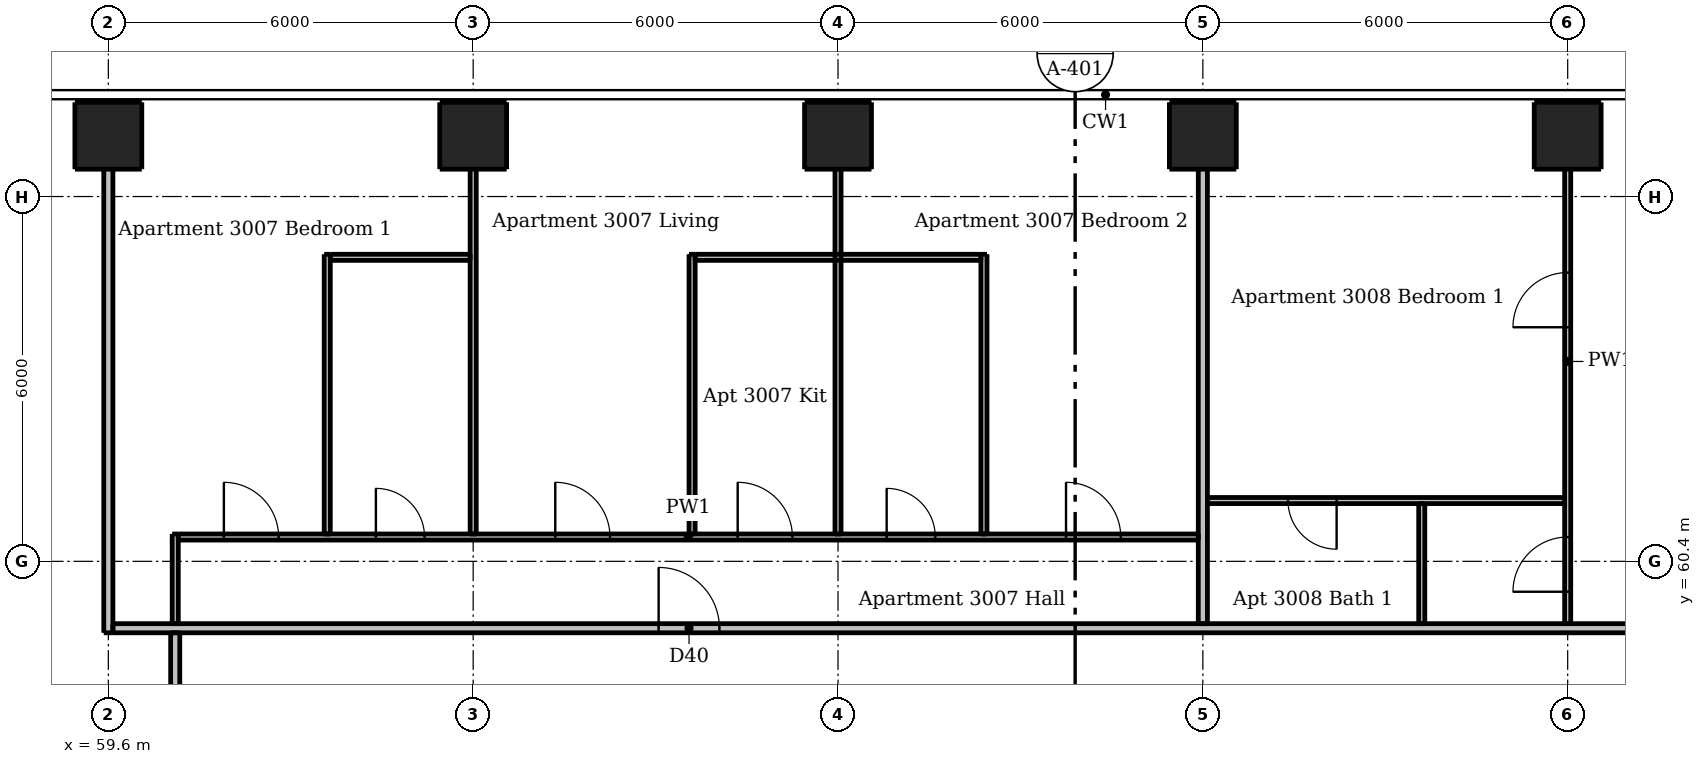
"""IFC4 building model, lengths in metres.
Left out: names, types, materials, properties, quantities, classifications, styles, units other than length and angle.
Written with IfcOpenShell. Run it as: python <this file> out.ifc"""

import sys

from ifc_helpers import new_model, si_unit, direction, frame, frame_2d, origin, origin_2d, place, context, subcontext, project, spatial, rectangle, extrude, element, fill, save


model = new_model("IFC4")
c1 = context("Model", 3, precision=1e-05, world=origin(), true_north=direction((0.0, 1.0)))
c2 = subcontext(c1, "Body", "Model", "MODEL_VIEW")
j1 = project(units=[si_unit("LENGTHUNIT", "METRE"), si_unit("PLANEANGLEUNIT", "RADIAN")], contexts=[c1])
p1 = place(None, origin())
s1 = spatial("IfcSite", under=j1, at=p1, CompositionType="ELEMENT")
p2 = place(p1, origin())
s2 = spatial("IfcBuilding", under=s1, at=p2, CompositionType="ELEMENT")
p3 = place(p2, frame((0.0, 0.0, 111.7)))
s3 = spatial("IfcBuildingStorey", under=s2, at=p3, CompositionType="ELEMENT", Elevation=111.7)
for number, where, z_axis, x_axis in (
    (1, (59.6, 67.4, 0.0), (0.0, 0.0, 1.0), (1.0, 0.0, 0.0)),
    (2, (65.6, 67.4, 0.0), (0.0, 0.0, 1.0), (1.0, 0.0, 0.0)),
    (3, (71.6, 67.4, 0.0), (0.0, 0.0, 1.0), (1.0, 0.0, 0.0)),
    (4, (77.6, 67.4, 0.0), (0.0, 0.0, 1.0), (1.0, 0.0, 0.0)),
    (5, (83.6, 67.4, 0.0), (0.0, 0.0, 1.0), (1.0, 0.0, 0.0)),
):
    element("IfcColumn", number, at=place(p3, frame(where, z_axis=z_axis, x_axis=x_axis)), inside=s3, PredefinedType="COLUMN", context=c2, shape_type="SweptSolid", body=[
        extrude(rectangle(XDim=1.1, YDim=1.1, at=origin_2d()), origin(), (0.0, 0.0, 1.0), 3.05),
    ])
p4 = place(p3, frame((60.7, 59.375, 0.0), z_axis=(0.0, 0.0, 1.0), x_axis=(0.0, 1.0, 0.0)))
e6 = element("IfcWall", 6, at=p4, inside=s3, PredefinedType="PARTITIONING", context=c2, shape_type="SweptSolid", body=[
    extrude(rectangle(XDim=1.475, YDim=0.1, at=frame_2d((0.738, 0.0))), origin(), (0.0, 0.0, 1.0), 3.05),
])
p5 = place(p3, frame((63.2, 60.85, 0.0), z_axis=(0.0, 0.0, 1.0), x_axis=(0.0, 1.0, 0.0)))
e7 = element("IfcWall", 7, at=p5, inside=s3, PredefinedType="PARTITIONING", context=c2, shape_type="SweptSolid", body=[
    extrude(rectangle(XDim=4.6, YDim=0.1, at=frame_2d((2.3, 0.0))), origin(), (0.0, 0.0, 1.0), 3.05),
])
p6 = place(p3, frame((65.6, 60.85, 0.0), z_axis=(0.0, 0.0, 1.0), x_axis=(0.0, 1.0, 0.0)))
e8 = element("IfcWall", 8, at=p6, inside=s3, PredefinedType="PARTITIONING", context=c2, shape_type="SweptSolid", body=[
    extrude(rectangle(XDim=7.15, YDim=0.1, at=frame_2d((3.575, 0.0))), origin(), (0.0, 0.0, 1.0), 2.516),
])
p7 = place(p3, frame((69.2, 60.85, 0.0), z_axis=(0.0, 0.0, 1.0), x_axis=(0.0, 1.0, 0.0)))
e9 = element("IfcWall", 9, at=p7, inside=s3, PredefinedType="PARTITIONING", context=c2, shape_type="SweptSolid", body=[
    extrude(rectangle(XDim=4.6, YDim=0.1, at=frame_2d((2.3, 0.0))), origin(), (0.0, 0.0, 1.0), 3.05),
])
p8 = place(p3, frame((71.6, 60.85, 0.0), z_axis=(0.0, 0.0, 1.0), x_axis=(0.0, 1.0, 0.0)))
e10 = element("IfcWall", 10, at=p8, inside=s3, PredefinedType="PARTITIONING", context=c2, shape_type="SweptSolid", body=[
    extrude(rectangle(XDim=7.15, YDim=0.1, at=frame_2d((3.575, 0.0))), origin(), (0.0, 0.0, 1.0), 2.516),
])
p9 = place(p3, frame((74.0, 60.85, 0.0), z_axis=(0.0, 0.0, 1.0), x_axis=(0.0, 1.0, 0.0)))
e11 = element("IfcWall", 11, at=p9, inside=s3, PredefinedType="PARTITIONING", context=c2, shape_type="SweptSolid", body=[
    extrude(rectangle(XDim=4.6, YDim=0.1, at=frame_2d((2.3, 0.0))), origin(), (0.0, 0.0, 1.0), 3.05),
])
p10 = place(p3, frame((81.2, 59.375, 0.0), z_axis=(0.0, 0.0, 1.0), x_axis=(0.0, 1.0, 0.0)))
e12 = element("IfcWall", 12, at=p10, inside=s3, PredefinedType="PARTITIONING", context=c2, shape_type="SweptSolid", body=[
    extrude(rectangle(XDim=1.975, YDim=0.1, at=frame_2d((0.988, 0.0))), origin(), (0.0, 0.0, 1.0), 3.05),
])
p11 = place(p3, frame((83.6, 59.375, 0.0), z_axis=(0.0, 0.0, 1.0), x_axis=(0.0, 1.0, 0.0)))
e13 = element("IfcWall", 13, at=p11, inside=s3, PredefinedType="PARTITIONING", context=c2, shape_type="SweptSolid", body=[
    extrude(rectangle(XDim=8.625, YDim=0.1, at=frame_2d((4.312, 0.0))), origin(), (0.0, 0.0, 1.0), 2.516),
])
p12 = place(p11, frame((0.525, 0.0, 0.0)))
e14 = element("IfcOpeningElement", 14, at=p12, cuts=e13, PredefinedType="OPENING", context=c2, shape_type="SweptSolid", body=[
    extrude(rectangle(XDim=0.9, YDim=2.1, at=frame_2d((0.45, 1.05))), frame((0.0, 0.06, 0.0), z_axis=(0.0, -1.0, 0.0), x_axis=(1.0, 0.0, 0.0)), (0.0, 0.0, 1.0), 0.12),
])
p13 = place(p11, frame((4.875, 0.0, 0.0)))
e15 = element("IfcOpeningElement", 15, at=p13, cuts=e13, PredefinedType="OPENING", context=c2, shape_type="SweptSolid", body=[
    extrude(rectangle(XDim=0.9, YDim=2.1, at=frame_2d((0.45, 1.05))), frame((0.0, 0.06, 0.0), z_axis=(0.0, -1.0, 0.0), x_axis=(1.0, 0.0, 0.0)), (0.0, 0.0, 1.0), 0.12),
])
p14 = place(p3, frame((63.25, 65.4, 0.0), z_axis=(0.0, 0.0, 1.0), x_axis=(1.0, 0.0, 0.0)))
e16 = element("IfcWall", 16, at=p14, inside=s3, PredefinedType="PARTITIONING", context=c2, shape_type="SweptSolid", body=[
    extrude(rectangle(XDim=2.3, YDim=0.1, at=frame_2d((1.15, 0.0))), origin(), (0.0, 0.0, 1.0), 3.05),
])
p15 = place(p3, frame((69.25, 65.4, 0.0), z_axis=(0.0, 0.0, 1.0), x_axis=(1.0, 0.0, 0.0)))
e17 = element("IfcWall", 17, at=p15, inside=s3, PredefinedType="PARTITIONING", context=c2, shape_type="SweptSolid", body=[
    extrude(rectangle(XDim=4.7, YDim=0.1, at=frame_2d((2.35, 0.0))), origin(), (0.0, 0.0, 1.0), 3.05),
])
p16 = place(p3, frame((83.55, 61.4, 0.0), z_axis=(0.0, 0.0, 1.0), x_axis=(-1.0, 0.0, 0.0)))
e18 = element("IfcWall", 18, at=p16, inside=s3, PredefinedType="PARTITIONING", context=c2, shape_type="SweptSolid", body=[
    extrude(rectangle(XDim=5.875, YDim=0.1, at=frame_2d((2.938, 0.0))), origin(), (0.0, 0.0, 1.0), 3.05),
])
p17 = place(p16, frame((3.75, 0.0, 0.0)))
e19 = element("IfcOpeningElement", 19, at=p17, cuts=e18, PredefinedType="OPENING", context=c2, shape_type="SweptSolid", body=[
    extrude(rectangle(XDim=0.8, YDim=2.1, at=frame_2d((0.4, 1.05))), frame((0.0, 0.06, 0.0), z_axis=(0.0, -1.0, 0.0), x_axis=(1.0, 0.0, 0.0)), (0.0, 0.0, 1.0), 0.12),
])
p18 = place(p3, frame((60.75, 60.8, 0.0), z_axis=(0.0, 0.0, 1.0), x_axis=(1.0, 0.0, 0.0)))
e20 = element("IfcWall", 20, at=p18, inside=s3, PredefinedType="PARTITIONING", context=c2, shape_type="SweptSolid", body=[
    extrude(rectangle(XDim=16.775, YDim=0.1, at=frame_2d((8.387, 0.0))), origin(), (0.0, 0.0, 1.0), 3.05),
])
p19 = place(p18, frame((6.2, 0.0, 0.0)))
e21 = element("IfcOpeningElement", 21, at=p19, cuts=e20, PredefinedType="OPENING", context=c2, shape_type="SweptSolid", body=[
    extrude(rectangle(XDim=0.9, YDim=2.1, at=frame_2d((0.45, 1.05))), frame((0.0, 0.06, 0.0), z_axis=(0.0, -1.0, 0.0), x_axis=(1.0, 0.0, 0.0)), (0.0, 0.0, 1.0), 0.12),
])
p20 = place(p18, frame((9.2, 0.0, 0.0)))
e22 = element("IfcOpeningElement", 22, at=p20, cuts=e20, PredefinedType="OPENING", context=c2, shape_type="SweptSolid", body=[
    extrude(rectangle(XDim=0.9, YDim=2.1, at=frame_2d((0.45, 1.05))), frame((0.0, 0.06, 0.0), z_axis=(0.0, -1.0, 0.0), x_axis=(1.0, 0.0, 0.0)), (0.0, 0.0, 1.0), 0.12),
])
p21 = place(p18, frame((0.75, 0.0, 0.0)))
e23 = element("IfcOpeningElement", 23, at=p21, cuts=e20, PredefinedType="OPENING", context=c2, shape_type="SweptSolid", body=[
    extrude(rectangle(XDim=0.9, YDim=2.1, at=frame_2d((0.45, 1.05))), frame((0.0, 0.06, 0.0), z_axis=(0.0, -1.0, 0.0), x_axis=(1.0, 0.0, 0.0)), (0.0, 0.0, 1.0), 0.12),
])
p22 = place(p18, frame((14.6, 0.0, 0.0)))
e24 = element("IfcOpeningElement", 24, at=p22, cuts=e20, PredefinedType="OPENING", context=c2, shape_type="SweptSolid", body=[
    extrude(rectangle(XDim=0.9, YDim=2.1, at=frame_2d((0.45, 1.05))), frame((0.0, 0.06, 0.0), z_axis=(0.0, -1.0, 0.0), x_axis=(1.0, 0.0, 0.0)), (0.0, 0.0, 1.0), 0.12),
])
p23 = place(p18, frame((3.25, 0.0, 0.0)))
e25 = element("IfcOpeningElement", 25, at=p23, cuts=e20, PredefinedType="OPENING", context=c2, shape_type="SweptSolid", body=[
    extrude(rectangle(XDim=0.8, YDim=2.1, at=frame_2d((0.4, 1.05))), frame((0.0, 0.06, 0.0), z_axis=(0.0, -1.0, 0.0), x_axis=(1.0, 0.0, 0.0)), (0.0, 0.0, 1.0), 0.12),
])
p24 = place(p18, frame((11.65, 0.0, 0.0)))
e26 = element("IfcOpeningElement", 26, at=p24, cuts=e20, PredefinedType="OPENING", context=c2, shape_type="SweptSolid", body=[
    extrude(rectangle(XDim=0.8, YDim=2.1, at=frame_2d((0.4, 1.05))), frame((0.0, 0.06, 0.0), z_axis=(0.0, -1.0, 0.0), x_axis=(1.0, 0.0, 0.0)), (0.0, 0.0, 1.0), 0.12),
])
p25 = place(p3, frame((59.6, 59.225, 0.0), z_axis=(0.0, 0.0, 1.0), x_axis=(0.0, 1.0, 0.0)))
e27 = element("IfcWall", 27, at=p25, inside=s3, PredefinedType="PARTITIONING", context=c2, shape_type="SweptSolid", body=[
    extrude(rectangle(XDim=8.775, YDim=0.15, at=frame_2d((4.387, 0.0))), origin(), (0.0, 0.0, 1.0), 2.51),
])
p26 = place(p3, frame((60.7, 30.325, 0.0), z_axis=(0.0, 0.0, 1.0), x_axis=(0.0, 1.0, 0.0)))
e28 = element("IfcWall", 28, at=p26, inside=s3, PredefinedType="PARTITIONING", context=c2, shape_type="SweptSolid", body=[
    extrude(rectangle(XDim=28.9, YDim=0.15, at=frame_2d((14.45, 0.0))), origin(), (0.0, 0.0, 1.0), 3.05),
])
p27 = place(p26, frame((9.225, 0.0, 0.0)))
e29 = element("IfcOpeningElement", 29, at=p27, cuts=e28, PredefinedType="OPENING", context=c2, shape_type="SweptSolid", body=[
    extrude(rectangle(XDim=1.0, YDim=2.1, at=frame_2d((0.5, 1.05))), frame((0.0, 0.085, 0.0), z_axis=(0.0, -1.0, 0.0), x_axis=(1.0, 0.0, 0.0)), (0.0, 0.0, 1.0), 0.17),
])
p28 = place(p26, frame((26.025, 0.0, 0.0)))
e30 = element("IfcOpeningElement", 30, at=p28, cuts=e28, PredefinedType="OPENING", context=c2, shape_type="SweptSolid", body=[
    extrude(rectangle(XDim=1.0, YDim=2.1, at=frame_2d((0.5, 1.05))), frame((0.0, 0.085, 0.0), z_axis=(0.0, -1.0, 0.0), x_axis=(1.0, 0.0, 0.0)), (0.0, 0.0, 1.0), 0.17),
])
p29 = place(p3, frame((77.6, 59.375, 0.0), z_axis=(0.0, 0.0, 1.0), x_axis=(0.0, 1.0, 0.0)))
e31 = element("IfcWall", 31, at=p29, inside=s3, PredefinedType="PARTITIONING", context=c2, shape_type="SweptSolid", body=[
    extrude(rectangle(XDim=8.625, YDim=0.15, at=frame_2d((4.312, 0.0))), origin(), (0.0, 0.0, 1.0), 2.516),
])
p30 = place(p3, frame((59.675, 59.3, 0.0), z_axis=(0.0, 0.0, 1.0), x_axis=(1.0, 0.0, 0.0)))
e32 = element("IfcWall", 32, at=p30, inside=s3, PredefinedType="PARTITIONING", context=c2, shape_type="SweptSolid", body=[
    extrude(rectangle(XDim=28.55, YDim=0.15, at=frame_2d((14.275, 0.0))), origin(), (0.0, 0.0, 1.0), 3.05),
])
p31 = place(p30, frame((8.975, 0.0, 0.0)))
e33 = element("IfcOpeningElement", 33, at=p31, cuts=e32, PredefinedType="OPENING", context=c2, shape_type="SweptSolid", body=[
    extrude(rectangle(XDim=1.0, YDim=2.1, at=frame_2d((0.5, 1.05))), frame((0.0, 0.085, 0.0), z_axis=(0.0, -1.0, 0.0), x_axis=(1.0, 0.0, 0.0)), (0.0, 0.0, 1.0), 0.17),
])
p32 = place(p30, frame((25.775, 0.0, 0.0)))
e34 = element("IfcOpeningElement", 34, at=p32, cuts=e32, PredefinedType="OPENING", context=c2, shape_type="SweptSolid", body=[
    extrude(rectangle(XDim=1.0, YDim=2.1, at=frame_2d((0.5, 1.05))), frame((0.0, 0.085, 0.0), z_axis=(0.0, -1.0, 0.0), x_axis=(1.0, 0.0, 0.0)), (0.0, 0.0, 1.0), 0.17),
])
p33 = place(p31, origin())
e35 = element("IfcDoor", 35, at=p33, inside=s3, OperationType="SINGLE_SWING_LEFT", PredefinedType="DOOR", context=c2, shape_type="SweptSolid", body=[
    extrude(rectangle(XDim=1.0, YDim=2.1, at=frame_2d((0.5, 1.05))), frame((0.0, 0.025, 0.0), z_axis=(0.0, -1.0, 0.0), x_axis=(1.0, 0.0, 0.0)), (0.0, 0.0, 1.0), 0.05),
])
fill(e33, e35)
p34 = place(p19, origin())
e36 = element("IfcDoor", 36, at=p34, inside=s3, OperationType="SINGLE_SWING_LEFT", PredefinedType="DOOR", context=c2, shape_type="SweptSolid", body=[
    extrude(rectangle(XDim=0.9, YDim=2.1, at=frame_2d((0.45, 1.05))), frame((0.0, 0.025, 0.0), z_axis=(0.0, -1.0, 0.0), x_axis=(1.0, 0.0, 0.0)), (0.0, 0.0, 1.0), 0.05),
])
fill(e21, e36)
p35 = place(p20, origin())
e37 = element("IfcDoor", 37, at=p35, inside=s3, OperationType="SINGLE_SWING_LEFT", PredefinedType="DOOR", context=c2, shape_type="SweptSolid", body=[
    extrude(rectangle(XDim=0.9, YDim=2.1, at=frame_2d((0.45, 1.05))), frame((0.0, 0.025, 0.0), z_axis=(0.0, -1.0, 0.0), x_axis=(1.0, 0.0, 0.0)), (0.0, 0.0, 1.0), 0.05),
])
fill(e22, e37)
p36 = place(p21, origin())
e38 = element("IfcDoor", 38, at=p36, inside=s3, OperationType="SINGLE_SWING_LEFT", PredefinedType="DOOR", context=c2, shape_type="SweptSolid", body=[
    extrude(rectangle(XDim=0.9, YDim=2.1, at=frame_2d((0.45, 1.05))), frame((0.0, 0.025, 0.0), z_axis=(0.0, -1.0, 0.0), x_axis=(1.0, 0.0, 0.0)), (0.0, 0.0, 1.0), 0.05),
])
fill(e23, e38)
p37 = place(p22, origin())
e39 = element("IfcDoor", 39, at=p37, inside=s3, OperationType="SINGLE_SWING_LEFT", PredefinedType="DOOR", context=c2, shape_type="SweptSolid", body=[
    extrude(rectangle(XDim=0.9, YDim=2.1, at=frame_2d((0.45, 1.05))), frame((0.0, 0.025, 0.0), z_axis=(0.0, -1.0, 0.0), x_axis=(1.0, 0.0, 0.0)), (0.0, 0.0, 1.0), 0.05),
])
fill(e24, e39)
p38 = place(p23, origin())
e40 = element("IfcDoor", 40, at=p38, inside=s3, OperationType="SINGLE_SWING_LEFT", PredefinedType="DOOR", context=c2, shape_type="SweptSolid", body=[
    extrude(rectangle(XDim=0.8, YDim=2.1, at=frame_2d((0.4, 1.05))), frame((0.0, 0.025, 0.0), z_axis=(0.0, -1.0, 0.0), x_axis=(1.0, 0.0, 0.0)), (0.0, 0.0, 1.0), 0.05),
])
fill(e25, e40)
p39 = place(p24, origin())
e41 = element("IfcDoor", 41, at=p39, inside=s3, OperationType="SINGLE_SWING_LEFT", PredefinedType="DOOR", context=c2, shape_type="SweptSolid", body=[
    extrude(rectangle(XDim=0.8, YDim=2.1, at=frame_2d((0.4, 1.05))), frame((0.0, 0.025, 0.0), z_axis=(0.0, -1.0, 0.0), x_axis=(1.0, 0.0, 0.0)), (0.0, 0.0, 1.0), 0.05),
])
fill(e26, e41)
p40 = place(p12, origin())
e42 = element("IfcDoor", 42, at=p40, inside=s3, OperationType="SINGLE_SWING_LEFT", PredefinedType="DOOR", context=c2, shape_type="SweptSolid", body=[
    extrude(rectangle(XDim=0.9, YDim=2.1, at=frame_2d((0.45, 1.05))), frame((0.0, 0.025, 0.0), z_axis=(0.0, -1.0, 0.0), x_axis=(1.0, 0.0, 0.0)), (0.0, 0.0, 1.0), 0.05),
])
fill(e14, e42)
p41 = place(p13, origin())
e43 = element("IfcDoor", 43, at=p41, inside=s3, OperationType="SINGLE_SWING_LEFT", PredefinedType="DOOR", context=c2, shape_type="SweptSolid", body=[
    extrude(rectangle(XDim=0.9, YDim=2.1, at=frame_2d((0.45, 1.05))), frame((0.0, 0.025, 0.0), z_axis=(0.0, -1.0, 0.0), x_axis=(1.0, 0.0, 0.0)), (0.0, 0.0, 1.0), 0.05),
])
fill(e15, e43)
p42 = place(p17, origin())
e44 = element("IfcDoor", 44, at=p42, inside=s3, OperationType="SINGLE_SWING_LEFT", PredefinedType="DOOR", context=c2, shape_type="SweptSolid", body=[
    extrude(rectangle(XDim=0.8, YDim=2.1, at=frame_2d((0.4, 1.05))), frame((0.0, 0.025, 0.0), z_axis=(0.0, -1.0, 0.0), x_axis=(1.0, 0.0, 0.0)), (0.0, 0.0, 1.0), 0.05),
])
fill(e19, e44)
save(model, sys.argv[1])
